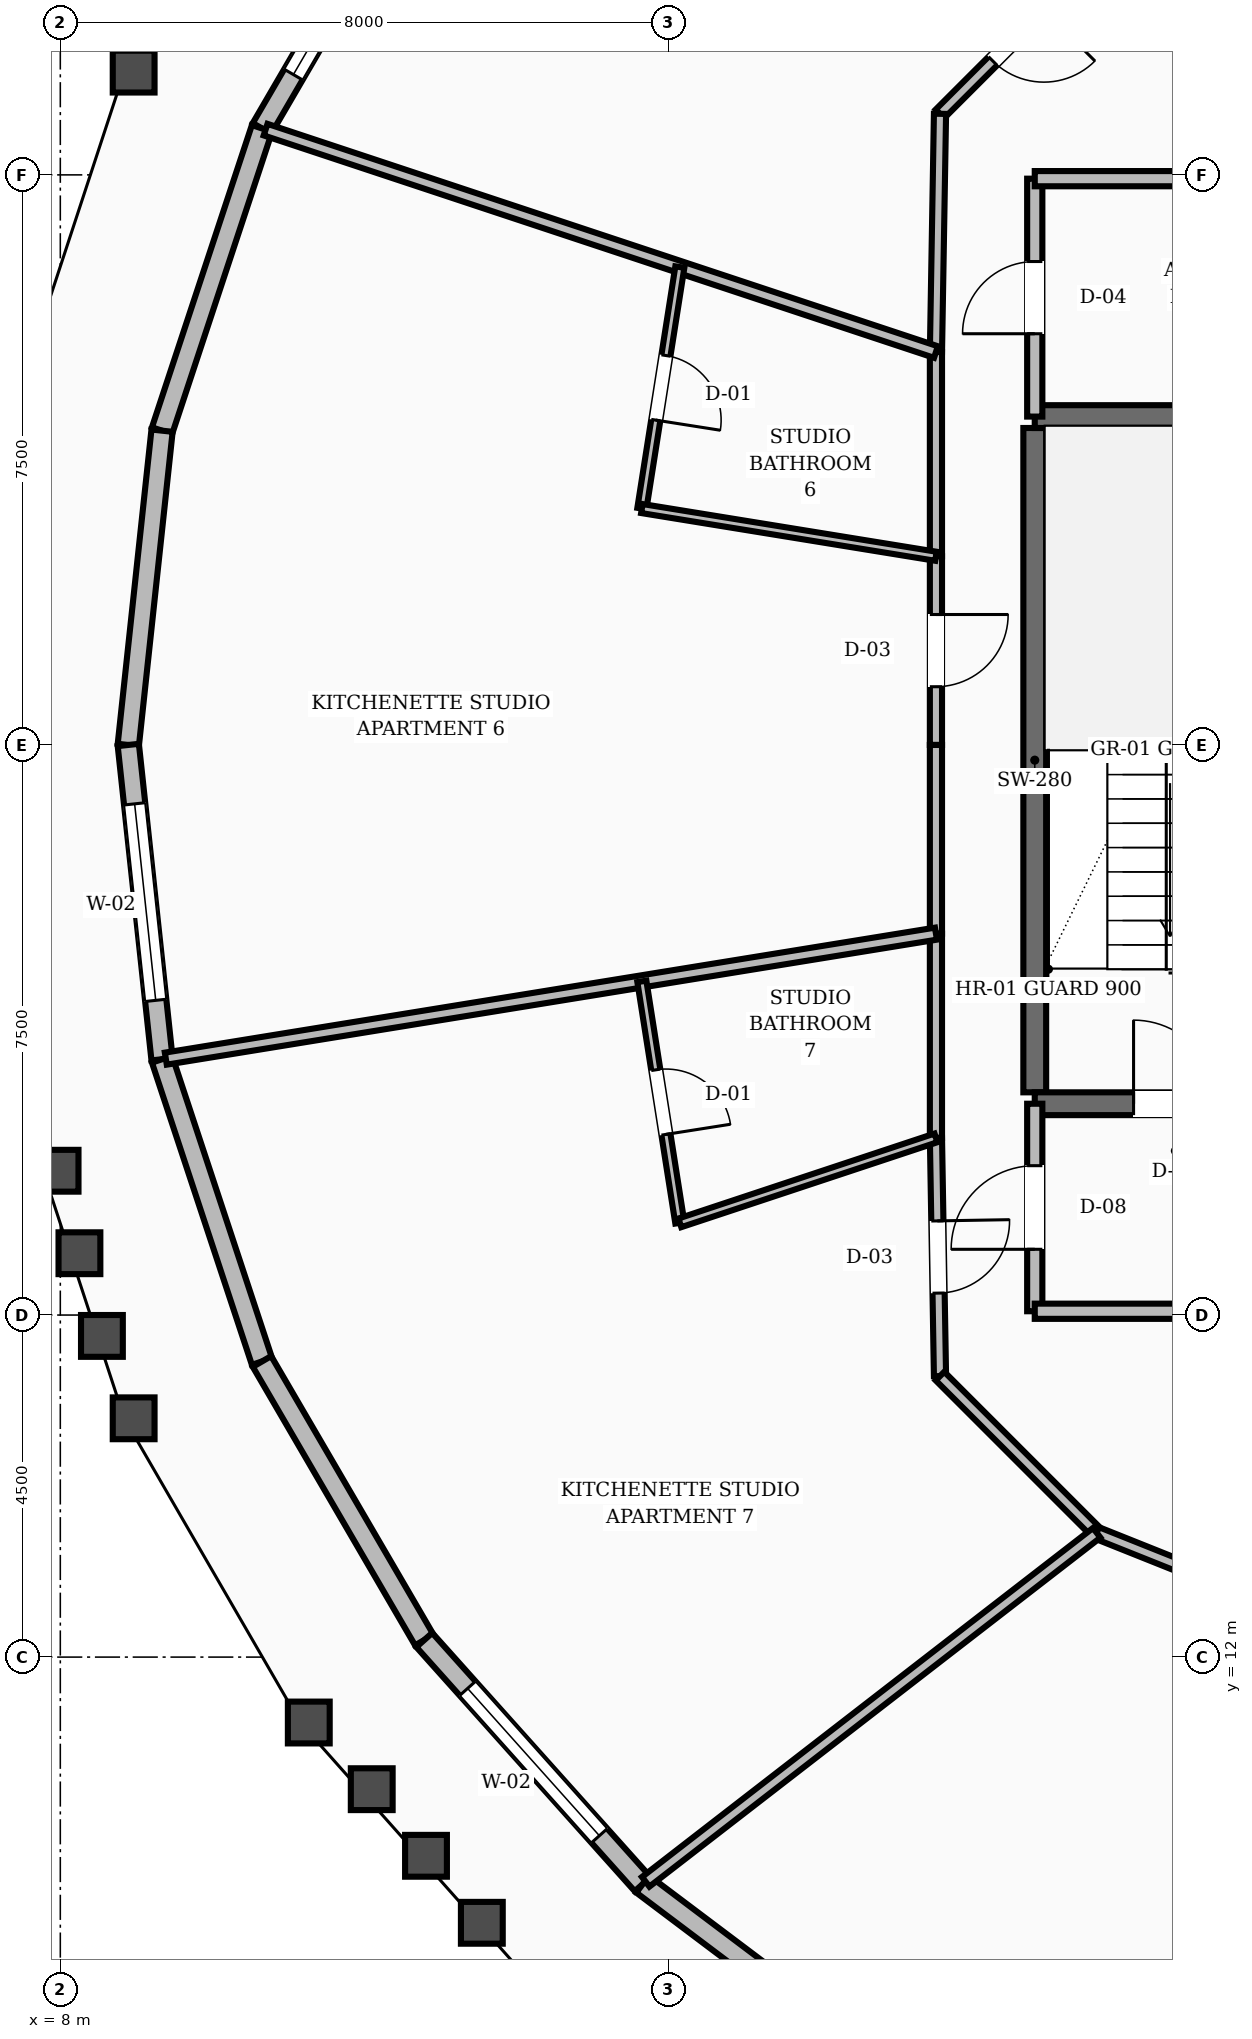
"""IFC4 building model, lengths in metres.
Left out: names, types, materials, properties, quantities, classifications, styles, units other than length and angle.
Written with IfcOpenShell. Run it as: python <this file> out.ifc"""

import sys

from ifc_helpers import new_model, si_unit, direction, frame, frame_2d, origin, place, context, subcontext, project, spatial, rectangle, extrude, element, fill, save


model = new_model("IFC4")
c1 = context("Model", 3, precision=1e-05, world=origin(), true_north=direction((0.0, 1.0)))
c2 = subcontext(c1, "Body", "Model", "MODEL_VIEW")
j1 = project(units=[si_unit("LENGTHUNIT", "METRE"), si_unit("PLANEANGLEUNIT", "RADIAN")], contexts=[c1])
p1 = place(None, origin())
s1 = spatial("IfcSite", under=j1, at=p1, CompositionType="ELEMENT")
p2 = place(p1, origin())
s2 = spatial("IfcBuilding", under=s1, at=p2, CompositionType="ELEMENT")
p3 = place(p2, frame((0.0, 0.0, 222.0)))
s3 = spatial("IfcBuildingStorey", under=s2, at=p3, CompositionType="ELEMENT", Elevation=222.0)
p4 = place(p3, frame((20.82, 19.43, 0.0), z_axis=(0.0, 0.0, 1.0), x_axis=(0.0, 1.0, 0.0)))
e1 = element("IfcWall", 1, at=p4, inside=s3, PredefinedType="SHEAR", context=c2, shape_type="SweptSolid", body=[
    extrude(rectangle(XDim=8.74, YDim=0.3, at=frame_2d((4.37, 0.0))), origin(), (0.0, 0.0, 1.0), 3.6),
])
p5 = place(p3, frame((20.82, 19.28, 0.0), z_axis=(0.0, 0.0, 1.0), x_axis=(1.0, 0.0, 0.0)))
e2 = element("IfcWall", 2, at=p5, inside=s3, PredefinedType="SHEAR", context=c2, shape_type="SweptSolid", body=[
    extrude(rectangle(XDim=3.6, YDim=0.3, at=frame_2d((1.8, 0.0))), origin(), (0.0, 0.0, 1.0), 3.6),
])
p6 = place(p5, frame((1.3, 0.0, 0.0)))
e3 = element("IfcOpeningElement", 3, at=p6, cuts=e2, PredefinedType="OPENING", context=c2, shape_type="SweptSolid", body=[
    extrude(rectangle(XDim=1.1, YDim=2.1, at=frame_2d((0.55, 1.05))), frame((0.0, 0.16, 0.0), z_axis=(0.0, -1.0, 0.0), x_axis=(1.0, 0.0, 0.0)), (0.0, 0.0, 1.0), 0.32),
])
p7 = place(p3, frame((20.82, 28.32, 0.0), z_axis=(0.0, 0.0, 1.0), x_axis=(1.0, 0.0, 0.0)))
e4 = element("IfcWall", 4, at=p7, inside=s3, PredefinedType="SHEAR", context=c2, shape_type="SweptSolid", body=[
    extrude(rectangle(XDim=3.6, YDim=0.3, at=frame_2d((1.8, 0.0))), origin(), (0.0, 0.0, 1.0), 3.6),
])
p8 = place(p3, frame((12.789, 35.775, 0.0), z_axis=(0.0, 0.0, 1.0), x_axis=(-0.503498718903, -0.863995972249, 0.0)))
e5 = element("IfcWall", 5, at=p8, inside=s3, PredefinedType="STANDARD", context=c2, shape_type="SweptSolid", body=[
    extrude(rectangle(XDim=4.241, YDim=0.28, at=frame_2d((2.12, 0.0))), origin(), (0.0, 0.0, 1.0), 2.88),
])
p9 = place(p8, frame((0.821, 0.0, 0.8)))
e6 = element("IfcOpeningElement", 6, at=p9, cuts=e5, PredefinedType="OPENING", context=c2, shape_type="SweptSolid", body=[
    extrude(rectangle(XDim=2.6, YDim=1.65, at=frame_2d((1.3, 0.825))), frame((0.0, 0.15, 0.0), z_axis=(0.0, -1.0, 0.0), x_axis=(1.0, 0.0, 0.0)), (0.0, 0.0, 1.0), 0.3),
])
p10 = place(p3, frame((10.653, 32.111, 0.0), z_axis=(0.0, 0.0, 1.0), x_axis=(-0.313988276285, -0.949426859929, 0.0)))
e7 = element("IfcWall", 7, at=p10, inside=s3, PredefinedType="STANDARD", context=c2, shape_type="SweptSolid", body=[
    extrude(rectangle(XDim=4.188, YDim=0.28, at=frame_2d((2.094, 0.0))), origin(), (0.0, 0.0, 1.0), 2.88),
])
p11 = place(p3, frame((9.338, 28.135, 0.0), z_axis=(0.0, 0.0, 1.0), x_axis=(-0.106732123458, -0.994287812367, 0.0)))
e8 = element("IfcWall", 8, at=p11, inside=s3, PredefinedType="STANDARD", context=c2, shape_type="SweptSolid", body=[
    extrude(rectangle(XDim=4.158, YDim=0.28, at=frame_2d((2.079, 0.0))), origin(), (0.0, 0.0, 1.0), 2.88),
])
p12 = place(p3, frame((8.895, 24.0, 0.0), z_axis=(0.0, 0.0, 1.0), x_axis=(0.106732123458, -0.994287812367, 0.0)))
e9 = element("IfcWall", 9, at=p12, inside=s3, PredefinedType="STANDARD", context=c2, shape_type="SweptSolid", body=[
    extrude(rectangle(XDim=4.158, YDim=0.28, at=frame_2d((2.079, 0.0))), origin(), (0.0, 0.0, 1.0), 2.88),
])
p13 = place(p12, frame((0.779, 0.0, 0.8)))
e10 = element("IfcOpeningElement", 10, at=p13, cuts=e9, PredefinedType="OPENING", context=c2, shape_type="SweptSolid", body=[
    extrude(rectangle(XDim=2.6, YDim=1.65, at=frame_2d((1.3, 0.825))), frame((0.0, 0.15, 0.0), z_axis=(0.0, -1.0, 0.0), x_axis=(1.0, 0.0, 0.0)), (0.0, 0.0, 1.0), 0.3),
])
p14 = place(p3, frame((9.338, 19.865, 0.0), z_axis=(0.0, 0.0, 1.0), x_axis=(0.313988276285, -0.949426859929, 0.0)))
e11 = element("IfcWall", 11, at=p14, inside=s3, PredefinedType="STANDARD", context=c2, shape_type="SweptSolid", body=[
    extrude(rectangle(XDim=4.188, YDim=0.28, at=frame_2d((2.094, 0.0))), origin(), (0.0, 0.0, 1.0), 2.88),
])
p15 = place(p3, frame((10.653, 15.889, 0.0), z_axis=(0.0, 0.0, 1.0), x_axis=(0.503498718903, -0.863995972249, 0.0)))
e12 = element("IfcWall", 12, at=p15, inside=s3, PredefinedType="STANDARD", context=c2, shape_type="SweptSolid", body=[
    extrude(rectangle(XDim=4.241, YDim=0.28, at=frame_2d((2.12, 0.0))), origin(), (0.0, 0.0, 1.0), 2.88),
])
p16 = place(p3, frame((12.789, 12.225, 0.0), z_axis=(0.0, 0.0, 1.0), x_axis=(0.666726962521, -0.745302057858, 0.0)))
e13 = element("IfcWall", 13, at=p16, inside=s3, PredefinedType="STANDARD", context=c2, shape_type="SweptSolid", body=[
    extrude(rectangle(XDim=4.31, YDim=0.28, at=frame_2d((2.155, 0.0))), origin(), (0.0, 0.0, 1.0), 2.88),
])
p17 = place(p16, frame((0.855, 0.0, 0.8)))
e14 = element("IfcOpeningElement", 14, at=p17, cuts=e13, PredefinedType="OPENING", context=c2, shape_type="SweptSolid", body=[
    extrude(rectangle(XDim=2.6, YDim=1.65, at=frame_2d((1.3, 0.825))), frame((0.0, 0.15, 0.0), z_axis=(0.0, -1.0, 0.0), x_axis=(1.0, 0.0, 0.0)), (0.0, 0.0, 1.0), 0.3),
])
p18 = place(p3, frame((15.662, 9.013, 0.0), z_axis=(0.0, 0.0, 1.0), x_axis=(0.798942565337, -0.601407330594, 0.0)))
e15 = element("IfcWall", 15, at=p18, inside=s3, PredefinedType="STANDARD", context=c2, shape_type="SweptSolid", body=[
    extrude(rectangle(XDim=4.383, YDim=0.28, at=frame_2d((2.191, 0.0))), origin(), (0.0, 0.0, 1.0), 2.88),
])
p19 = place(p3, frame((20.82, 16.55, 0.0), z_axis=(0.0, 0.0, 1.0), x_axis=(0.0, 1.0, 0.0)))
e16 = element("IfcWall", 16, at=p19, inside=s3, PredefinedType="SOLIDWALL", context=c2, shape_type="SweptSolid", body=[
    extrude(rectangle(XDim=2.73, YDim=0.2, at=frame_2d((1.365, 0.0))), origin(), (0.0, 0.0, 1.0), 2.87),
])
p20 = place(p19, frame((0.815, 0.0, 0.0)))
e17 = element("IfcOpeningElement", 17, at=p20, cuts=e16, PredefinedType="OPENING", context=c2, shape_type="SweptSolid", body=[
    extrude(rectangle(XDim=1.1, YDim=2.1, at=frame_2d((0.55, 1.05))), frame((0.0, 0.11, 0.0), z_axis=(0.0, -1.0, 0.0), x_axis=(1.0, 0.0, 0.0)), (0.0, 0.0, 1.0), 0.22),
])
p21 = place(p3, frame((20.82, 16.55, 0.0), z_axis=(0.0, 0.0, 1.0), x_axis=(1.0, 0.0, 0.0)))
e18 = element("IfcWall", 18, at=p21, inside=s3, PredefinedType="SOLIDWALL", context=c2, shape_type="SweptSolid", body=[
    extrude(rectangle(XDim=3.98, YDim=0.2, at=frame_2d((1.99, 0.0))), origin(), (0.0, 0.0, 1.0), 2.87),
])
p22 = place(p3, frame((20.82, 28.32, 0.0), z_axis=(0.0, 0.0, 1.0), x_axis=(0.0, 1.0, 0.0)))
e19 = element("IfcWall", 19, at=p22, inside=s3, PredefinedType="SOLIDWALL", context=c2, shape_type="SweptSolid", body=[
    extrude(rectangle(XDim=3.13, YDim=0.2, at=frame_2d((1.565, 0.0))), origin(), (0.0, 0.0, 1.0), 2.87),
])
p23 = place(p22, frame((1.09, 0.0, 0.0)))
e20 = element("IfcOpeningElement", 20, at=p23, cuts=e19, PredefinedType="OPENING", context=c2, shape_type="SweptSolid", body=[
    extrude(rectangle(XDim=0.95, YDim=2.1, at=frame_2d((0.475, 1.05))), frame((0.0, 0.11, 0.0), z_axis=(0.0, -1.0, 0.0), x_axis=(1.0, 0.0, 0.0)), (0.0, 0.0, 1.0), 0.22),
])
p24 = place(p3, frame((20.82, 31.45, 0.0), z_axis=(0.0, 0.0, 1.0), x_axis=(1.0, 0.0, 0.0)))
e21 = element("IfcWall", 21, at=p24, inside=s3, PredefinedType="SOLIDWALL", context=c2, shape_type="SweptSolid", body=[
    extrude(rectangle(XDim=3.98, YDim=0.2, at=frame_2d((1.99, 0.0))), origin(), (0.0, 0.0, 1.0), 2.87),
])
p25 = place(p3, frame((21.635, 34.365, 0.0), z_axis=(0.0, 0.0, 1.0), x_axis=(-0.707106781187, -0.707106781187, 0.0)))
e22 = element("IfcWall", 22, at=p25, inside=s3, PredefinedType="SOLIDWALL", context=c2, shape_type="SweptSolid", body=[
    extrude(rectangle(XDim=2.916, YDim=0.16, at=frame_2d((1.458, 0.0))), origin(), (0.0, 0.0, 1.0), 2.87),
])
p26 = place(p25, frame((0.983, 0.0, 0.0)))
e23 = element("IfcOpeningElement", 23, at=p26, cuts=e22, PredefinedType="OPENING", context=c2, shape_type="SweptSolid", body=[
    extrude(rectangle(XDim=0.95, YDim=2.1, at=frame_2d((0.475, 1.05))), frame((0.0, 0.09, 0.0), z_axis=(0.0, -1.0, 0.0), x_axis=(1.0, 0.0, 0.0)), (0.0, 0.0, 1.0), 0.18),
])
p27 = place(p3, frame((19.573, 32.303, 0.0), z_axis=(0.0, 0.0, 1.0), x_axis=(-0.016981035134, -0.999855811828, 0.0)))
e24 = element("IfcWall", 24, at=p27, inside=s3, PredefinedType="SOLIDWALL", context=c2, shape_type="SweptSolid", body=[
    extrude(rectangle(XDim=3.134, YDim=0.16, at=frame_2d((1.567, 0.0))), origin(), (0.0, 0.0, 1.0), 2.87),
])
p28 = place(p3, frame((19.52, 29.169, 0.0), z_axis=(0.0, 0.0, 1.0), x_axis=(0.0, -1.0, 0.0)))
e25 = element("IfcWall", 25, at=p28, inside=s3, PredefinedType="SOLIDWALL", context=c2, shape_type="SweptSolid", body=[
    extrude(rectangle(XDim=2.687, YDim=0.16, at=frame_2d((1.344, 0.0))), origin(), (0.0, 0.0, 1.0), 2.87),
])
p29 = place(p3, frame((19.52, 26.482, 0.0), z_axis=(0.0, 0.0, 1.0), x_axis=(0.0, -1.0, 0.0)))
e26 = element("IfcWall", 26, at=p29, inside=s3, PredefinedType="SOLIDWALL", context=c2, shape_type="SweptSolid", body=[
    extrude(rectangle(XDim=2.482, YDim=0.16, at=frame_2d((1.241, 0.0))), origin(), (0.0, 0.0, 1.0), 2.87),
])
p30 = place(p29, frame((0.766, 0.0, 0.0)))
e27 = element("IfcOpeningElement", 27, at=p30, cuts=e26, PredefinedType="OPENING", context=c2, shape_type="SweptSolid", body=[
    extrude(rectangle(XDim=0.95, YDim=2.1, at=frame_2d((0.475, 1.05))), frame((0.0, 0.09, 0.0), z_axis=(0.0, -1.0, 0.0), x_axis=(1.0, 0.0, 0.0)), (0.0, 0.0, 1.0), 0.18),
])
p31 = place(p3, frame((19.52, 24.0, 0.0), z_axis=(0.0, 0.0, 1.0), x_axis=(0.0, -1.0, 0.0)))
e28 = element("IfcWall", 28, at=p31, inside=s3, PredefinedType="SOLIDWALL", context=c2, shape_type="SweptSolid", body=[
    extrude(rectangle(XDim=2.482, YDim=0.16, at=frame_2d((1.241, 0.0))), origin(), (0.0, 0.0, 1.0), 2.87),
])
p32 = place(p3, frame((19.52, 21.518, 0.0), z_axis=(0.0, 0.0, 1.0), x_axis=(0.0, -1.0, 0.0)))
e29 = element("IfcWall", 29, at=p32, inside=s3, PredefinedType="SOLIDWALL", context=c2, shape_type="SweptSolid", body=[
    extrude(rectangle(XDim=2.687, YDim=0.16, at=frame_2d((1.344, 0.0))), origin(), (0.0, 0.0, 1.0), 2.87),
])
p33 = place(p3, frame((19.52, 18.831, 0.0), z_axis=(0.0, 0.0, 1.0), x_axis=(0.016981035134, -0.999855811828, 0.0)))
e30 = element("IfcWall", 30, at=p33, inside=s3, PredefinedType="SOLIDWALL", context=c2, shape_type="SweptSolid", body=[
    extrude(rectangle(XDim=3.134, YDim=0.16, at=frame_2d((1.567, 0.0))), origin(), (0.0, 0.0, 1.0), 2.87),
])
p34 = place(p33, frame((1.092, 0.0, 0.0)))
e31 = element("IfcOpeningElement", 31, at=p34, cuts=e30, PredefinedType="OPENING", context=c2, shape_type="SweptSolid", body=[
    extrude(rectangle(XDim=0.95, YDim=2.1, at=frame_2d((0.475, 1.05))), frame((0.0, 0.09, 0.0), z_axis=(0.0, -1.0, 0.0), x_axis=(1.0, 0.0, 0.0)), (0.0, 0.0, 1.0), 0.18),
])
p35 = place(p3, frame((19.573, 15.697, 0.0), z_axis=(0.0, 0.0, 1.0), x_axis=(0.707106781187, -0.707106781187, 0.0)))
e32 = element("IfcWall", 32, at=p35, inside=s3, PredefinedType="SOLIDWALL", context=c2, shape_type="SweptSolid", body=[
    extrude(rectangle(XDim=2.916, YDim=0.16, at=frame_2d((1.458, 0.0))), origin(), (0.0, 0.0, 1.0), 2.87),
])
p36 = place(p3, frame((21.635, 13.635, 0.0), z_axis=(0.0, 0.0, 1.0), x_axis=(0.92856882165, -0.371160266542, 0.0)))
e33 = element("IfcWall", 33, at=p36, inside=s3, PredefinedType="SOLIDWALL", context=c2, shape_type="SweptSolid", body=[
    extrude(rectangle(XDim=2.923, YDim=0.16, at=frame_2d((1.461, 0.0))), origin(), (0.0, 0.0, 1.0), 2.87),
])
p37 = place(p3, frame((19.52, 29.169, 0.0), z_axis=(0.0, 0.0, 1.0), x_axis=(-0.949134247943, 0.314871687171, 0.0)))
e34 = element("IfcWall", 34, at=p37, inside=s3, PredefinedType="SOLIDWALL", context=c2, shape_type="SweptSolid", body=[
    extrude(rectangle(XDim=9.292, YDim=0.16, at=frame_2d((4.646, 0.0))), origin(), (0.0, 0.0, 1.0), 2.87),
])
p38 = place(p3, frame((16.151, 30.287, 0.0), z_axis=(0.0, 0.0, 1.0), x_axis=(-0.15540506101, -0.987850832369, 0.0)))
e35 = element("IfcWall", 35, at=p38, inside=s3, PredefinedType="PARTITIONING", context=c2, shape_type="SweptSolid", body=[
    extrude(rectangle(XDim=3.216, YDim=0.12, at=frame_2d((1.608, 0.0))), origin(), (0.0, 0.0, 1.0), 2.87),
])
p39 = place(p38, frame((1.178, 0.0, 0.0)))
e36 = element("IfcOpeningElement", 36, at=p39, cuts=e35, PredefinedType="OPENING", context=c2, shape_type="SweptSolid", body=[
    extrude(rectangle(XDim=0.86, YDim=2.1, at=frame_2d((0.43, 1.05))), frame((0.0, 0.07, 0.0), z_axis=(0.0, -1.0, 0.0), x_axis=(1.0, 0.0, 0.0)), (0.0, 0.0, 1.0), 0.14),
])
p40 = place(p3, frame((19.52, 26.482, 0.0), z_axis=(0.0, 0.0, 1.0), x_axis=(-0.98708525511, 0.160195815001, 0.0)))
e37 = element("IfcWall", 37, at=p40, inside=s3, PredefinedType="PARTITIONING", context=c2, shape_type="SweptSolid", body=[
    extrude(rectangle(XDim=3.92, YDim=0.12, at=frame_2d((1.96, 0.0))), origin(), (0.0, 0.0, 1.0), 2.87),
])
p41 = place(p3, frame((19.52, 21.518, 0.0), z_axis=(0.0, 0.0, 1.0), x_axis=(-0.987086273653, -0.16018953888, 0.0)))
e38 = element("IfcWall", 38, at=p41, inside=s3, PredefinedType="SOLIDWALL", context=c2, shape_type="SweptSolid", body=[
    extrude(rectangle(XDim=10.265, YDim=0.16, at=frame_2d((5.132, 0.0))), origin(), (0.0, 0.0, 1.0), 2.87),
])
p42 = place(p3, frame((15.651, 20.89, 0.0), z_axis=(0.0, 0.0, 1.0), x_axis=(0.15540506101, -0.987850832369, 0.0)))
e39 = element("IfcWall", 39, at=p42, inside=s3, PredefinedType="PARTITIONING", context=c2, shape_type="SweptSolid", body=[
    extrude(rectangle(XDim=3.216, YDim=0.12, at=frame_2d((1.608, 0.0))), origin(), (0.0, 0.0, 1.0), 2.87),
])
p43 = place(p42, frame((1.178, 0.0, 0.0)))
e40 = element("IfcOpeningElement", 40, at=p43, cuts=e39, PredefinedType="OPENING", context=c2, shape_type="SweptSolid", body=[
    extrude(rectangle(XDim=0.86, YDim=2.1, at=frame_2d((0.43, 1.05))), frame((0.0, 0.07, 0.0), z_axis=(0.0, -1.0, 0.0), x_axis=(1.0, 0.0, 0.0)), (0.0, 0.0, 1.0), 0.14),
])
p44 = place(p3, frame((19.52, 18.831, 0.0), z_axis=(0.0, 0.0, 1.0), x_axis=(-0.949143073376, -0.314845082959, 0.0)))
e41 = element("IfcWall", 41, at=p44, inside=s3, PredefinedType="PARTITIONING", context=c2, shape_type="SweptSolid", body=[
    extrude(rectangle(XDim=3.55, YDim=0.12, at=frame_2d((1.775, 0.0))), origin(), (0.0, 0.0, 1.0), 2.87),
])
p45 = place(p3, frame((21.635, 13.635, 0.0), z_axis=(0.0, 0.0, 1.0), x_axis=(-0.790881200299, -0.611969710863, 0.0)))
e42 = element("IfcWall", 42, at=p45, inside=s3, PredefinedType="SOLIDWALL", context=c2, shape_type="SweptSolid", body=[
    extrude(rectangle(XDim=7.502, YDim=0.16, at=frame_2d((3.751, 0.0))), origin(), (0.0, 0.0, 1.0), 2.87),
])
p46 = place(p9, origin())
e43 = element("IfcWindow", 43, at=p46, inside=s3, PartitioningType="SINGLE_PANEL", PredefinedType="WINDOW", context=c2, shape_type="SweptSolid", body=[
    extrude(rectangle(XDim=2.6, YDim=1.65, at=frame_2d((1.3, 0.825))), frame((0.0, 0.03, 0.0), z_axis=(0.0, -1.0, 0.0), x_axis=(1.0, 0.0, 0.0)), (0.0, 0.0, 1.0), 0.06),
])
fill(e6, e43)
p47 = place(p13, origin())
e44 = element("IfcWindow", 44, at=p47, inside=s3, PartitioningType="SINGLE_PANEL", PredefinedType="WINDOW", context=c2, shape_type="SweptSolid", body=[
    extrude(rectangle(XDim=2.6, YDim=1.65, at=frame_2d((1.3, 0.825))), frame((0.0, 0.03, 0.0), z_axis=(0.0, -1.0, 0.0), x_axis=(1.0, 0.0, 0.0)), (0.0, 0.0, 1.0), 0.06),
])
fill(e10, e44)
p48 = place(p17, origin())
e45 = element("IfcWindow", 45, at=p48, inside=s3, PartitioningType="SINGLE_PANEL", PredefinedType="WINDOW", context=c2, shape_type="SweptSolid", body=[
    extrude(rectangle(XDim=2.6, YDim=1.65, at=frame_2d((1.3, 0.825))), frame((0.0, 0.03, 0.0), z_axis=(0.0, -1.0, 0.0), x_axis=(1.0, 0.0, 0.0)), (0.0, 0.0, 1.0), 0.06),
])
fill(e14, e45)
p49 = place(p6, origin())
e46 = element("IfcDoor", 46, at=p49, inside=s3, OperationType="SINGLE_SWING_LEFT", PredefinedType="DOOR", context=c2, shape_type="SweptSolid", body=[
    extrude(rectangle(XDim=1.1, YDim=2.1, at=frame_2d((0.55, 1.05))), frame((0.0, 0.025, 0.0), z_axis=(0.0, -1.0, 0.0), x_axis=(1.0, 0.0, 0.0)), (0.0, 0.0, 1.0), 0.05),
])
fill(e3, e46)
p50 = place(p20, origin())
e47 = element("IfcDoor", 47, at=p50, inside=s3, OperationType="SINGLE_SWING_LEFT", PredefinedType="DOOR", context=c2, shape_type="SweptSolid", body=[
    extrude(rectangle(XDim=1.1, YDim=2.1, at=frame_2d((0.55, 1.05))), frame((0.0, 0.025, 0.0), z_axis=(0.0, -1.0, 0.0), x_axis=(1.0, 0.0, 0.0)), (0.0, 0.0, 1.0), 0.05),
])
fill(e17, e47)
p51 = place(p23, origin())
e48 = element("IfcDoor", 48, at=p51, inside=s3, OperationType="SINGLE_SWING_LEFT", PredefinedType="DOOR", context=c2, shape_type="SweptSolid", body=[
    extrude(rectangle(XDim=0.95, YDim=2.1, at=frame_2d((0.475, 1.05))), frame((0.0, 0.025, 0.0), z_axis=(0.0, -1.0, 0.0), x_axis=(1.0, 0.0, 0.0)), (0.0, 0.0, 1.0), 0.05),
])
fill(e20, e48)
p52 = place(p26, origin())
e49 = element("IfcDoor", 49, at=p52, inside=s3, OperationType="SINGLE_SWING_LEFT", PredefinedType="DOOR", context=c2, shape_type="SweptSolid", body=[
    extrude(rectangle(XDim=0.95, YDim=2.1, at=frame_2d((0.475, 1.05))), frame((0.0, 0.025, 0.0), z_axis=(0.0, -1.0, 0.0), x_axis=(1.0, 0.0, 0.0)), (0.0, 0.0, 1.0), 0.05),
])
fill(e23, e49)
p53 = place(p39, origin())
e50 = element("IfcDoor", 50, at=p53, inside=s3, OperationType="SINGLE_SWING_RIGHT", PredefinedType="DOOR", context=c2, shape_type="SweptSolid", body=[
    extrude(rectangle(XDim=0.86, YDim=2.1, at=frame_2d((0.43, 1.05))), frame((0.0, 0.025, 0.0), z_axis=(0.0, -1.0, 0.0), x_axis=(1.0, 0.0, 0.0)), (0.0, 0.0, 1.0), 0.05),
])
fill(e36, e50)
p54 = place(p30, origin())
e51 = element("IfcDoor", 51, at=p54, inside=s3, OperationType="SINGLE_SWING_LEFT", PredefinedType="DOOR", context=c2, shape_type="SweptSolid", body=[
    extrude(rectangle(XDim=0.95, YDim=2.1, at=frame_2d((0.475, 1.05))), frame((0.0, 0.025, 0.0), z_axis=(0.0, -1.0, 0.0), x_axis=(1.0, 0.0, 0.0)), (0.0, 0.0, 1.0), 0.05),
])
fill(e27, e51)
p55 = place(p43, origin())
e52 = element("IfcDoor", 52, at=p55, inside=s3, OperationType="SINGLE_SWING_RIGHT", PredefinedType="DOOR", context=c2, shape_type="SweptSolid", body=[
    extrude(rectangle(XDim=0.86, YDim=2.1, at=frame_2d((0.43, 1.05))), frame((0.0, 0.025, 0.0), z_axis=(0.0, -1.0, 0.0), x_axis=(1.0, 0.0, 0.0)), (0.0, 0.0, 1.0), 0.05),
])
fill(e40, e52)
p56 = place(p34, origin())
e53 = element("IfcDoor", 53, at=p56, inside=s3, OperationType="SINGLE_SWING_LEFT", PredefinedType="DOOR", context=c2, shape_type="SweptSolid", body=[
    extrude(rectangle(XDim=0.95, YDim=2.1, at=frame_2d((0.475, 1.05))), frame((0.0, 0.025, 0.0), z_axis=(0.0, -1.0, 0.0), x_axis=(1.0, 0.0, 0.0)), (0.0, 0.0, 1.0), 0.05),
])
fill(e31, e53)
save(model, sys.argv[1])
